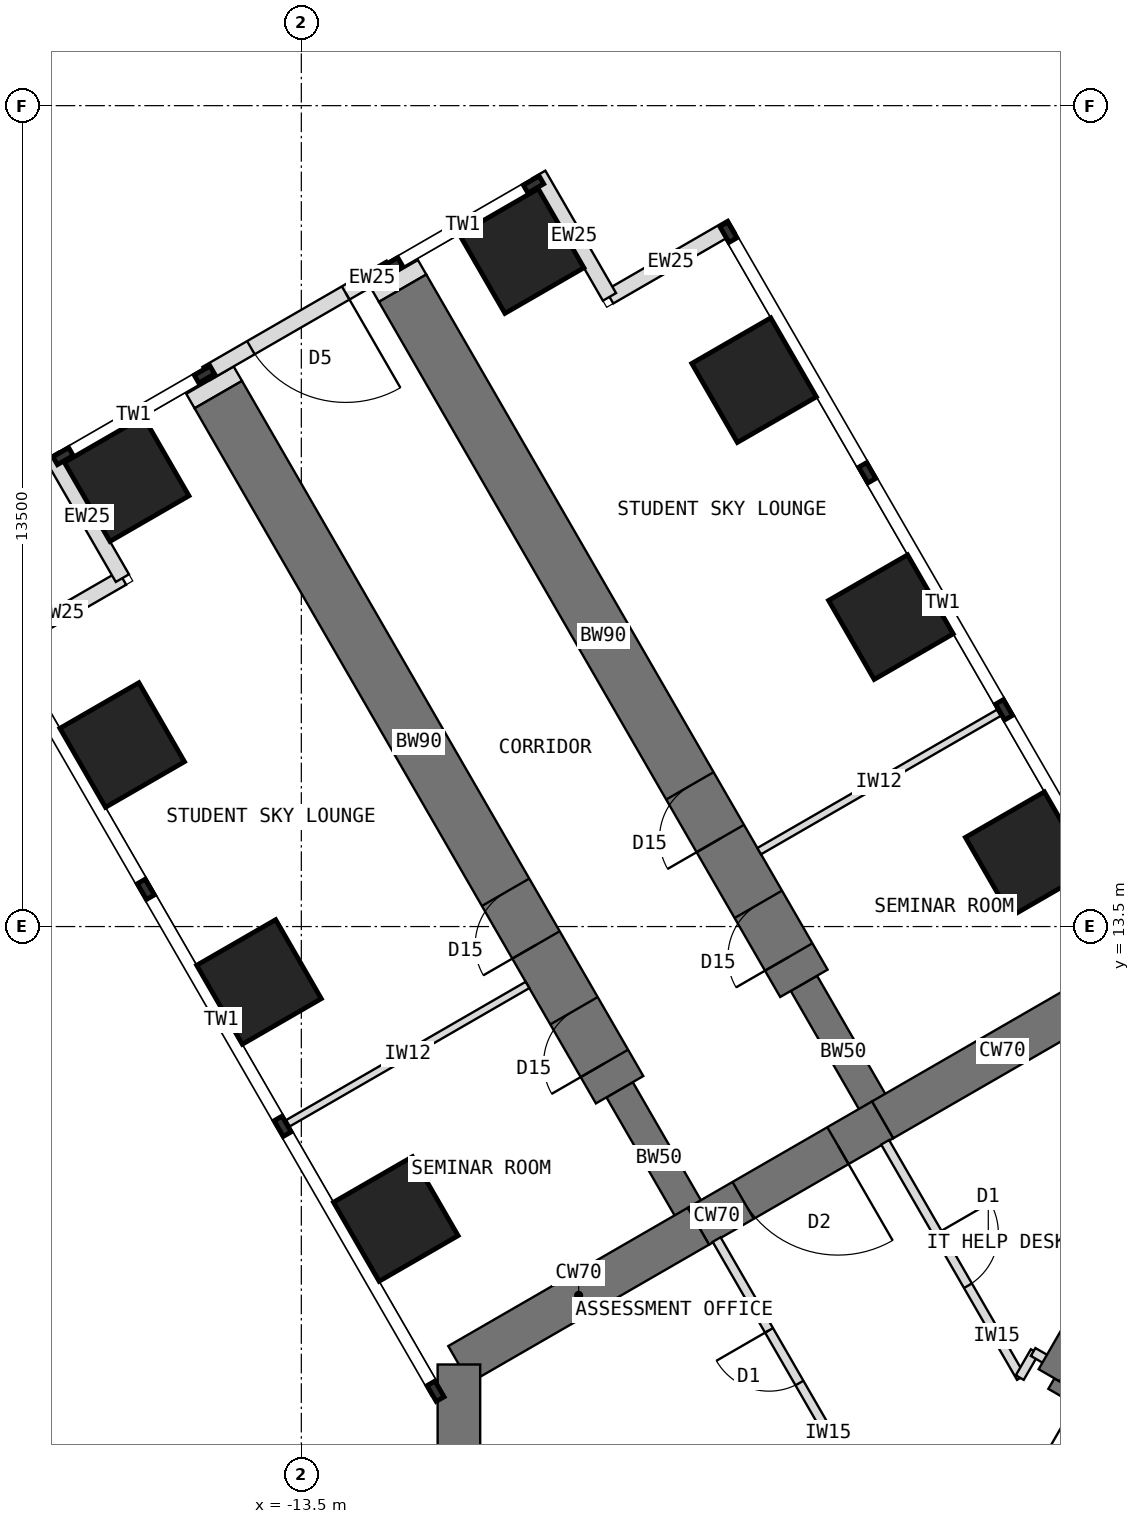
"""IFC4 building model, lengths in metres.
Left out: names, types, materials, properties, quantities, classifications, styles, units other than length and angle.
Written with IfcOpenShell. Run it as: python <this file> out.ifc"""

import sys

from ifc_helpers import new_model, si_unit, direction, frame, frame_2d, origin, origin_2d, place, context, subcontext, project, spatial, rectangle, extrude, element, fill, save


model = new_model("IFC4")
c1 = context("Model", 3, precision=1e-05, world=origin(), true_north=direction((0.0, 1.0)))
c2 = subcontext(c1, "Body", "Model", "MODEL_VIEW")
j1 = project(units=[si_unit("LENGTHUNIT", "METRE"), si_unit("PLANEANGLEUNIT", "RADIAN")], contexts=[c1])
p1 = place(None, origin())
s1 = spatial("IfcSite", under=j1, at=p1, CompositionType="ELEMENT")
p2 = place(p1, origin())
s2 = spatial("IfcBuilding", under=s1, at=p2, CompositionType="ELEMENT")
p3 = place(p2, frame((0.0, 0.0, 20.5)))
s3 = spatial("IfcBuildingStorey", under=s2, at=p3, CompositionType="ELEMENT", Elevation=20.5)
p4 = place(p3, frame((0.0, 12.596, 0.0), z_axis=(0.0, 0.0, 1.0), x_axis=(-0.866011268655, -0.500024481964, 0.0)))
e1 = element("IfcWall", 1, at=p4, inside=s3, PredefinedType="SHEAR", context=c2, shape_type="SweptSolid", body=[
    extrude(rectangle(XDim=4.548, YDim=0.7, at=frame_2d((2.274, 0.0))), origin(), (0.0, 0.0, 1.0), 4.0),
])
p5 = place(p3, frame((-3.939, 10.322, 0.0), z_axis=(0.0, 0.0, 1.0), x_axis=(-0.866019471182, -0.500010275428, 0.0)))
e2 = element("IfcWall", 2, at=p5, inside=s3, PredefinedType="SHEAR", context=c2, shape_type="SweptSolid", body=[
    extrude(rectangle(XDim=3.5, YDim=0.7, at=frame_2d((1.75, 0.0))), origin(), (0.0, 0.0, 1.0), 4.0),
])
p6 = place(p5, frame((0.85, 0.0, 0.0)))
e3 = element("IfcOpeningElement", 3, at=p6, cuts=e2, PredefinedType="OPENING", context=c2, shape_type="SweptSolid", body=[
    extrude(rectangle(XDim=1.8, YDim=2.1, at=frame_2d((0.9, 1.05))), frame((0.0, 0.36, 0.0), z_axis=(0.0, -1.0, 0.0), x_axis=(1.0, 0.0, 0.0)), (0.0, 0.0, 1.0), 0.72),
])
p7 = place(p3, frame((-6.97, 8.572, 0.0), z_axis=(0.0, 0.0, 1.0), x_axis=(-0.866034513004, -0.499984222037, 0.0)))
e4 = element("IfcWall", 4, at=p7, inside=s3, PredefinedType="SHEAR", context=c2, shape_type="SweptSolid", body=[
    extrude(rectangle(XDim=4.548, YDim=0.7, at=frame_2d((2.274, 0.0))), origin(), (0.0, 0.0, 1.0), 4.0),
])
p8 = place(p3, frame((-10.908, 6.298, 0.0), z_axis=(0.0, 0.0, 1.0), x_axis=(0.0, -1.0, 0.0)))
e5 = element("IfcWall", 5, at=p8, inside=s3, PredefinedType="SHEAR", context=c2, shape_type="SweptSolid", body=[
    extrude(rectangle(XDim=12.596, YDim=0.7, at=frame_2d((6.298, 0.0))), origin(), (0.0, 0.0, 1.0), 4.0),
])
p9 = place(p3, frame((-6.97, 8.572, 0.0), z_axis=(0.0, 0.0, 1.0), x_axis=(-0.499988811324, 0.866031863473, 0.0)))
e6 = element("IfcWall", 6, at=p9, inside=s3, PredefinedType="SHEAR", context=c2, shape_type="SweptSolid", body=[
    extrude(rectangle(XDim=2.592, YDim=0.5, at=frame_2d((1.296, 0.0))), origin(), (0.0, 0.0, 1.0), 4.0),
])
p10 = place(p3, frame((-8.266, 10.816, 0.0), z_axis=(0.0, 0.0, 1.0), x_axis=(-0.499996231654, 0.866027579429, 0.0)))
e7 = element("IfcWall", 7, at=p10, inside=s3, PredefinedType="SHEAR", context=c2, shape_type="SweptSolid", body=[
    extrude(rectangle(XDim=13.2, YDim=0.9, at=frame_2d((6.6, 0.0))), origin(), (0.0, 0.0, 1.0), 4.0),
])
p11 = place(p10, frame((0.5, 0.0, 0.0)))
e8 = element("IfcOpeningElement", 8, at=p11, cuts=e7, PredefinedType="OPENING", context=c2, shape_type="SweptSolid", body=[
    extrude(rectangle(XDim=1.0, YDim=2.1, at=frame_2d((0.5, 1.05))), frame((0.0, 0.46, 0.0), z_axis=(0.0, -1.0, 0.0), x_axis=(1.0, 0.0, 0.0)), (0.0, 0.0, 1.0), 0.92),
])
p12 = place(p10, frame((2.75, 0.0, 0.0)))
e9 = element("IfcOpeningElement", 9, at=p12, cuts=e7, PredefinedType="OPENING", context=c2, shape_type="SweptSolid", body=[
    extrude(rectangle(XDim=1.0, YDim=2.1, at=frame_2d((0.5, 1.05))), frame((0.0, 0.46, 0.0), z_axis=(0.0, -1.0, 0.0), x_axis=(1.0, 0.0, 0.0)), (0.0, 0.0, 1.0), 0.92),
])
p13 = place(p3, frame((-3.939, 10.322, 0.0), z_axis=(0.0, 0.0, 1.0), x_axis=(-0.499918158782, 0.866072649678, 0.0)))
e10 = element("IfcWall", 10, at=p13, inside=s3, PredefinedType="SHEAR", context=c2, shape_type="SweptSolid", body=[
    extrude(rectangle(XDim=2.592, YDim=0.5, at=frame_2d((1.296, 0.0))), origin(), (0.0, 0.0, 1.0), 4.0),
])
p14 = place(p3, frame((-5.234, 12.566, 0.0), z_axis=(0.0, 0.0, 1.0), x_axis=(-0.500010103361, 0.866019570528, 0.0)))
e11 = element("IfcWall", 11, at=p14, inside=s3, PredefinedType="SHEAR", context=c2, shape_type="SweptSolid", body=[
    extrude(rectangle(XDim=13.2, YDim=0.9, at=frame_2d((6.6, 0.0))), origin(), (0.0, 0.0, 1.0), 4.0),
])
p15 = place(p14, frame((0.5, 0.0, 0.0)))
e12 = element("IfcOpeningElement", 12, at=p15, cuts=e11, PredefinedType="OPENING", context=c2, shape_type="SweptSolid", body=[
    extrude(rectangle(XDim=1.0, YDim=2.1, at=frame_2d((0.5, 1.05))), frame((0.0, 0.46, 0.0), z_axis=(0.0, -1.0, 0.0), x_axis=(1.0, 0.0, 0.0)), (0.0, 0.0, 1.0), 0.92),
])
p16 = place(p14, frame((2.75, 0.0, 0.0)))
e13 = element("IfcOpeningElement", 13, at=p16, cuts=e11, PredefinedType="OPENING", context=c2, shape_type="SweptSolid", body=[
    extrude(rectangle(XDim=1.0, YDim=2.1, at=frame_2d((0.5, 1.05))), frame((0.0, 0.46, 0.0), z_axis=(0.0, -1.0, 0.0), x_axis=(1.0, 0.0, 0.0)), (0.0, 0.0, 1.0), 0.92),
])
for number, where, z_axis, x_axis in (
    (14, (-11.946, 8.691, 0.0), (0.0, 0.0, 1.0), (0.866, 0.5, 0.0)),
    (15, (-1.554, 14.691, 0.0), (0.0, 0.0, 1.0), (0.866, 0.5, 0.0)),
    (16, (-14.196, 12.588, 0.0), (0.0, 0.0, 1.0), (0.866, 0.5, 0.0)),
    (17, (-3.804, 18.588, 0.0), (0.0, 0.0, 1.0), (0.866, 0.5, 0.0)),
    (18, (-16.446, 16.486, 0.0), (0.0, 0.0, 1.0), (0.866, 0.5, 0.0)),
    (19, (-6.054, 22.486, 0.0), (0.0, 0.0, 1.0), (0.866, 0.5, 0.0)),
    (20, (-16.373, 20.858, 0.0), (0.0, 0.0, 1.0), (0.866, 0.5, 0.0)),
    (21, (-9.877, 24.608, 0.0), (0.0, 0.0, 1.0), (0.866, 0.5, 0.0)),
):
    element("IfcColumn", number, at=place(p3, frame(where, z_axis=z_axis, x_axis=x_axis)), inside=s3, PredefinedType="COLUMN", context=c2, shape_type="SweptSolid", body=[
        extrude(rectangle(XDim=1.5, YDim=1.5, at=origin_2d()), origin(), (0.0, 0.0, 1.0), 4.0),
    ])
for number, where, z_axis, x_axis in (
    (22, (-18.456, 18.067, 0.0), (0.0, 0.0, 1.0), (0.866, 0.5, 0.0)),
    (23, (-16.443, 19.23, 0.0), (0.0, 0.0, 1.0), (-0.5, 0.866, 0.0)),
    (24, (-6.419, 25.017, 0.0), (0.0, 0.0, 1.0), (-0.866, -0.5, 0.0)),
    (25, (-8.432, 23.855, 0.0), (0.0, 0.0, 1.0), (-0.5, 0.866, 0.0)),
):
    element("IfcWall", number, at=place(p3, frame(where, z_axis=z_axis, x_axis=x_axis)), inside=s3, PredefinedType="STANDARD", context=c2, shape_type="SweptSolid", body=[
        extrude(rectangle(XDim=2.325, YDim=0.25, at=frame_2d((1.163, 0.0))), origin(), (0.0, 0.0, 1.0), 3.8),
    ])
p17 = place(p3, frame((-12.034, 24.344, 0.0), z_axis=(0.0, 0.0, 1.0), x_axis=(-0.866019471182, -0.500010275428, 0.0)))
e26 = element("IfcWall", 26, at=p17, inside=s3, PredefinedType="STANDARD", context=c2, shape_type="SweptSolid", body=[
    extrude(rectangle(XDim=3.5, YDim=0.25, at=frame_2d((1.75, 0.0))), origin(), (0.0, 0.0, 1.0), 3.8),
])
p18 = place(p17, frame((0.85, 0.0, 0.0)))
e27 = element("IfcOpeningElement", 27, at=p18, cuts=e26, PredefinedType="OPENING", context=c2, shape_type="SweptSolid", body=[
    extrude(rectangle(XDim=1.8, YDim=2.4, at=frame_2d((0.9, 1.2))), frame((0.0, 0.135, 0.0), z_axis=(0.0, -1.0, 0.0), x_axis=(1.0, 0.0, 0.0)), (0.0, 0.0, 1.0), 0.27),
])
for number, where, z_axis, x_axis in (
    (28, (-14.865, 22.248, 0.0), (0.0, 0.0, 1.0), (-0.5, 0.866, 0.0)),
    (29, (-11.834, 23.998, 0.0), (0.0, 0.0, 1.0), (-0.5, 0.866, 0.0)),
):
    element("IfcWall", number, at=place(p3, frame(where, z_axis=z_axis, x_axis=x_axis)), inside=s3, PredefinedType="PARTITIONING", context=c2, shape_type="SweptSolid", body=[
        extrude(rectangle(XDim=0.275, YDim=0.9, at=frame_2d((0.138, 0.0))), origin(), (0.0, 0.0, 1.0), 3.8),
    ])
p19 = place(p3, frame((5.764, 1.984, 0.0), z_axis=(0.0, 0.0, 1.0), x_axis=(-0.866026010844, 0.49999894854, 0.0)))
e30 = element("IfcWall", 30, at=p19, inside=s3, PredefinedType="SHEAR", context=c2, shape_type="SweptSolid", body=[
    extrude(rectangle(XDim=8.0, YDim=0.2, at=frame_2d((4.0, 0.0))), origin(), (0.0, 0.0, 1.0), 4.0),
])
p20 = place(p19, frame((6.3, 0.0, 0.0)))
e31 = element("IfcOpeningElement", 31, at=p20, cuts=e30, PredefinedType="OPENING", context=c2, shape_type="SweptSolid", body=[
    extrude(rectangle(XDim=1.2, YDim=2.1, at=frame_2d((0.6, 1.05))), frame((0.0, 0.11, 0.0), z_axis=(0.0, -1.0, 0.0), x_axis=(1.0, 0.0, 0.0)), (0.0, 0.0, 1.0), 0.22),
])
p21 = place(p19, frame((0.9, 0.0, 0.0)))
e32 = element("IfcOpeningElement", 32, at=p21, cuts=e30, PredefinedType="OPENING", context=c2, shape_type="SweptSolid", body=[
    extrude(rectangle(XDim=1.1, YDim=2.2, at=frame_2d((0.55, 1.1))), frame((0.0, 0.11, 0.0), z_axis=(0.0, -1.0, 0.0), x_axis=(1.0, 0.0, 0.0)), (0.0, 0.0, 1.0), 0.22),
])
p22 = place(p19, frame((3.8, 0.0, 0.0)))
e33 = element("IfcOpeningElement", 33, at=p22, cuts=e30, PredefinedType="OPENING", context=c2, shape_type="SweptSolid", body=[
    extrude(rectangle(XDim=1.1, YDim=2.2, at=frame_2d((0.55, 1.1))), frame((0.0, 0.11, 0.0), z_axis=(0.0, -1.0, 0.0), x_axis=(1.0, 0.0, 0.0)), (0.0, 0.0, 1.0), 0.22),
])
p23 = place(p3, frame((-1.201, 6.12, 0.0), z_axis=(0.0, 0.0, 1.0), x_axis=(0.500002627198, 0.866023886965, 0.0)))
e34 = element("IfcWall", 34, at=p23, inside=s3, PredefinedType="SHEAR", context=c2, shape_type="SweptSolid", body=[
    extrude(rectangle(XDim=5.858, YDim=0.4, at=frame_2d((2.929, 0.0))), origin(), (0.0, 0.0, 1.0), 4.0),
])
for number, where, z_axis, x_axis in (
    (35, (-9.78, 12.54, 0.0), (0.0, 0.0, 1.0), (-0.866, -0.5, 0.0)),
    (36, (-5.97, 14.74, 0.0), (0.0, 0.0, 1.0), (0.866, 0.5, 0.0)),
):
    element("IfcWall", number, at=place(p3, frame(where, z_axis=z_axis, x_axis=x_axis)), inside=s3, PredefinedType="PARTITIONING", context=c2, shape_type="SweptSolid", body=[
        extrude(rectangle(XDim=4.55, YDim=0.12, at=frame_2d((2.275, 0.0))), origin(), (0.0, 0.0, 1.0), 3.8),
    ])
p24 = place(p3, frame((-4.436, 4.483, 0.0), z_axis=(0.0, 0.0, 1.0), x_axis=(-0.500017246033, 0.866015446554, 0.0)))
e37 = element("IfcWall", 37, at=p24, inside=s3, PredefinedType="PARTITIONING", context=c2, shape_type="SweptSolid", body=[
    extrude(rectangle(XDim=4.469, YDim=0.15, at=frame_2d((2.234, 0.0))), origin(), (0.0, 0.0, 1.0), 3.8),
])
p25 = place(p24, frame((1.744, 0.0, 0.0)))
e38 = element("IfcOpeningElement", 38, at=p25, cuts=e37, PredefinedType="OPENING", context=c2, shape_type="SweptSolid", body=[
    extrude(rectangle(XDim=1.0, YDim=2.1, at=frame_2d((0.5, 1.05))), frame((0.0, 0.085, 0.0), z_axis=(0.0, -1.0, 0.0), x_axis=(1.0, 0.0, 0.0)), (0.0, 0.0, 1.0), 0.17),
])
p26 = place(p3, frame((-3.898, 9.952, 0.0), z_axis=(0.0, 0.0, 1.0), x_axis=(0.499999927604, -0.866025445582, 0.0)))
e39 = element("IfcWall", 39, at=p26, inside=s3, PredefinedType="PARTITIONING", context=c2, shape_type="SweptSolid", body=[
    extrude(rectangle(XDim=4.468, YDim=0.15, at=frame_2d((2.234, 0.0))), origin(), (0.0, 0.0, 1.0), 3.8),
])
p27 = place(p26, frame((1.724, 0.0, 0.0)))
e40 = element("IfcOpeningElement", 40, at=p27, cuts=e39, PredefinedType="OPENING", context=c2, shape_type="SweptSolid", body=[
    extrude(rectangle(XDim=1.0, YDim=2.1, at=frame_2d((0.5, 1.05))), frame((0.0, 0.085, 0.0), z_axis=(0.0, -1.0, 0.0), x_axis=(1.0, 0.0, 0.0)), (0.0, 0.0, 1.0), 0.17),
])
p28 = place(p3, frame((-1.684, 6.083, 0.0), z_axis=(0.0, 0.0, 1.0), x_axis=(0.50033519877, 0.865831790172, 0.0)))
e41 = element("IfcWall", 41, at=p28, inside=s3, PredefinedType="PARTITIONING", context=c2, shape_type="SweptSolid", body=[
    extrude(rectangle(XDim=0.494, YDim=0.15, at=frame_2d((0.247, 0.0))), origin(), (0.0, 0.0, 1.0), 3.8),
])
p29 = place(p3, frame((-1.464, 6.503, 0.0), z_axis=(0.0, 0.0, 1.0), x_axis=(0.866138304741, -0.499804398801, 0.0)))
e42 = element("IfcWall", 42, at=p29, inside=s3, PredefinedType="PARTITIONING", context=c2, shape_type="SweptSolid", body=[
    extrude(rectangle(XDim=0.43, YDim=0.15, at=frame_2d((0.215, 0.0))), origin(), (0.0, 0.0, 1.0), 3.8),
])
p30 = place(p18, origin())
e43 = element("IfcDoor", 43, at=p30, inside=s3, OperationType="DOUBLE_DOOR_DOUBLE_SWING", PredefinedType="DOOR", context=c2, shape_type="SweptSolid", body=[
    extrude(rectangle(XDim=1.8, YDim=2.4, at=frame_2d((0.9, 1.2))), frame((0.0, 0.025, 0.0), z_axis=(0.0, -1.0, 0.0), x_axis=(1.0, 0.0, 0.0)), (0.0, 0.0, 1.0), 0.05),
])
fill(e27, e43)
p31 = place(p6, origin())
e44 = element("IfcDoor", 44, at=p31, inside=s3, OperationType="DOUBLE_DOOR_DOUBLE_SWING", PredefinedType="DOOR", context=c2, shape_type="SweptSolid", body=[
    extrude(rectangle(XDim=1.72, YDim=2.06, at=frame_2d((0.9, 1.03))), frame((0.0, 0.025, 0.0), z_axis=(0.0, -1.0, 0.0), x_axis=(1.0, 0.0, 0.0)), (0.0, 0.0, 1.0), 0.05),
    extrude(rectangle(XDim=0.04, YDim=2.1, at=frame_2d((0.02, 1.05))), frame((0.0, 0.35, 0.0), z_axis=(0.0, -1.0, 0.0), x_axis=(1.0, 0.0, 0.0)), (0.0, 0.0, 1.0), 0.699),
    extrude(rectangle(XDim=0.04, YDim=2.1, at=frame_2d((1.78, 1.05))), frame((0.0, 0.35, 0.0), z_axis=(0.0, -1.0, 0.0), x_axis=(1.0, 0.0, 0.0)), (0.0, 0.0, 1.0), 0.699),
    extrude(rectangle(XDim=1.72, YDim=0.04, at=frame_2d((0.9, 2.08))), frame((0.0, 0.35, 0.0), z_axis=(0.0, -1.0, 0.0), x_axis=(1.0, 0.0, 0.0)), (0.0, 0.0, 1.0), 0.699),
])
fill(e3, e44)
p32 = place(p27, origin())
e45 = element("IfcDoor", 45, at=p32, inside=s3, OperationType="SINGLE_SWING_LEFT", PredefinedType="DOOR", context=c2, shape_type="SweptSolid", body=[
    extrude(rectangle(XDim=1.0, YDim=2.1, at=frame_2d((0.5, 1.05))), frame((0.0, 0.025, 0.0), z_axis=(0.0, -1.0, 0.0), x_axis=(1.0, 0.0, 0.0)), (0.0, 0.0, 1.0), 0.05),
])
fill(e40, e45)
p33 = place(p25, origin())
e46 = element("IfcDoor", 46, at=p33, inside=s3, OperationType="SINGLE_SWING_RIGHT", PredefinedType="DOOR", context=c2, shape_type="SweptSolid", body=[
    extrude(rectangle(XDim=1.0, YDim=2.1, at=frame_2d((0.5, 1.05))), frame((0.0, 0.025, 0.0), z_axis=(0.0, -1.0, 0.0), x_axis=(1.0, 0.0, 0.0)), (0.0, 0.0, 1.0), 0.05),
])
fill(e38, e46)
p34 = place(p11, origin())
e47 = element("IfcDoor", 47, at=p34, inside=s3, OperationType="SINGLE_SWING_LEFT", PredefinedType="DOOR", context=c2, shape_type="SweptSolid", body=[
    extrude(rectangle(XDim=0.92, YDim=2.06, at=frame_2d((0.5, 1.03))), frame((0.0, 0.025, 0.0), z_axis=(0.0, -1.0, 0.0), x_axis=(1.0, 0.0, 0.0)), (0.0, 0.0, 1.0), 0.05),
    extrude(rectangle(XDim=0.04, YDim=2.1, at=frame_2d((0.02, 1.05))), frame((0.0, 0.45, 0.0), z_axis=(0.0, -1.0, 0.0), x_axis=(1.0, 0.0, 0.0)), (0.0, 0.0, 1.0), 0.899),
    extrude(rectangle(XDim=0.04, YDim=2.1, at=frame_2d((0.98, 1.05))), frame((0.0, 0.45, 0.0), z_axis=(0.0, -1.0, 0.0), x_axis=(1.0, 0.0, 0.0)), (0.0, 0.0, 1.0), 0.899),
    extrude(rectangle(XDim=0.92, YDim=0.04, at=frame_2d((0.5, 2.08))), frame((0.0, 0.45, 0.0), z_axis=(0.0, -1.0, 0.0), x_axis=(1.0, 0.0, 0.0)), (0.0, 0.0, 1.0), 0.899),
])
fill(e8, e47)
p35 = place(p12, origin())
e48 = element("IfcDoor", 48, at=p35, inside=s3, OperationType="SINGLE_SWING_LEFT", PredefinedType="DOOR", context=c2, shape_type="SweptSolid", body=[
    extrude(rectangle(XDim=0.92, YDim=2.06, at=frame_2d((0.5, 1.03))), frame((0.0, 0.025, 0.0), z_axis=(0.0, -1.0, 0.0), x_axis=(1.0, 0.0, 0.0)), (0.0, 0.0, 1.0), 0.05),
    extrude(rectangle(XDim=0.04, YDim=2.1, at=frame_2d((0.02, 1.05))), frame((0.0, 0.45, 0.0), z_axis=(0.0, -1.0, 0.0), x_axis=(1.0, 0.0, 0.0)), (0.0, 0.0, 1.0), 0.899),
    extrude(rectangle(XDim=0.04, YDim=2.1, at=frame_2d((0.98, 1.05))), frame((0.0, 0.45, 0.0), z_axis=(0.0, -1.0, 0.0), x_axis=(1.0, 0.0, 0.0)), (0.0, 0.0, 1.0), 0.899),
    extrude(rectangle(XDim=0.92, YDim=0.04, at=frame_2d((0.5, 2.08))), frame((0.0, 0.45, 0.0), z_axis=(0.0, -1.0, 0.0), x_axis=(1.0, 0.0, 0.0)), (0.0, 0.0, 1.0), 0.899),
])
fill(e9, e48)
p36 = place(p15, origin())
e49 = element("IfcDoor", 49, at=p36, inside=s3, OperationType="SINGLE_SWING_LEFT", PredefinedType="DOOR", context=c2, shape_type="SweptSolid", body=[
    extrude(rectangle(XDim=0.92, YDim=2.06, at=frame_2d((0.5, 1.03))), frame((0.0, 0.025, 0.0), z_axis=(0.0, -1.0, 0.0), x_axis=(1.0, 0.0, 0.0)), (0.0, 0.0, 1.0), 0.05),
    extrude(rectangle(XDim=0.04, YDim=2.1, at=frame_2d((0.02, 1.05))), frame((0.0, 0.45, 0.0), z_axis=(0.0, -1.0, 0.0), x_axis=(1.0, 0.0, 0.0)), (0.0, 0.0, 1.0), 0.899),
    extrude(rectangle(XDim=0.04, YDim=2.1, at=frame_2d((0.98, 1.05))), frame((0.0, 0.45, 0.0), z_axis=(0.0, -1.0, 0.0), x_axis=(1.0, 0.0, 0.0)), (0.0, 0.0, 1.0), 0.899),
    extrude(rectangle(XDim=0.92, YDim=0.04, at=frame_2d((0.5, 2.08))), frame((0.0, 0.45, 0.0), z_axis=(0.0, -1.0, 0.0), x_axis=(1.0, 0.0, 0.0)), (0.0, 0.0, 1.0), 0.899),
])
fill(e12, e49)
p37 = place(p16, origin())
e50 = element("IfcDoor", 50, at=p37, inside=s3, OperationType="SINGLE_SWING_LEFT", PredefinedType="DOOR", context=c2, shape_type="SweptSolid", body=[
    extrude(rectangle(XDim=0.92, YDim=2.06, at=frame_2d((0.5, 1.03))), frame((0.0, 0.025, 0.0), z_axis=(0.0, -1.0, 0.0), x_axis=(1.0, 0.0, 0.0)), (0.0, 0.0, 1.0), 0.05),
    extrude(rectangle(XDim=0.04, YDim=2.1, at=frame_2d((0.02, 1.05))), frame((0.0, 0.45, 0.0), z_axis=(0.0, -1.0, 0.0), x_axis=(1.0, 0.0, 0.0)), (0.0, 0.0, 1.0), 0.899),
    extrude(rectangle(XDim=0.04, YDim=2.1, at=frame_2d((0.98, 1.05))), frame((0.0, 0.45, 0.0), z_axis=(0.0, -1.0, 0.0), x_axis=(1.0, 0.0, 0.0)), (0.0, 0.0, 1.0), 0.899),
    extrude(rectangle(XDim=0.92, YDim=0.04, at=frame_2d((0.5, 2.08))), frame((0.0, 0.45, 0.0), z_axis=(0.0, -1.0, 0.0), x_axis=(1.0, 0.0, 0.0)), (0.0, 0.0, 1.0), 0.899),
])
fill(e13, e50)
save(model, sys.argv[1])
